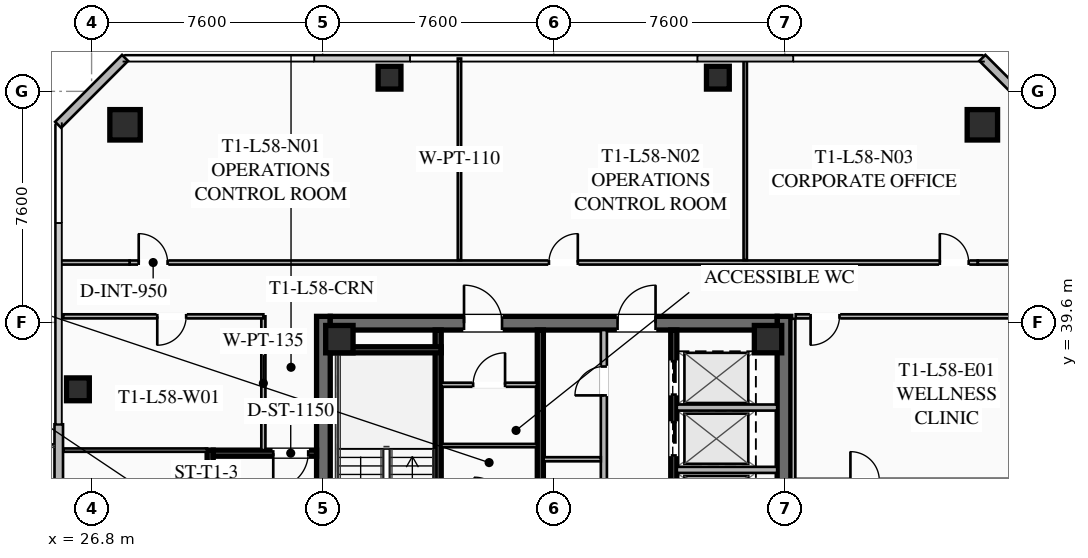
"""IFC4 building model, lengths in metres.
Left out: names, types, materials, properties, quantities, classifications, styles, units other than length and angle.
Written with IfcOpenShell. Run it as: python <this file> out.ifc"""

import sys

from ifc_helpers import new_model, si_unit, direction, frame, frame_2d, origin, origin_2d, place, context, subcontext, project, spatial, rectangle, hollow_rectangle, extrude, element, fill, save


model = new_model("IFC4")
c1 = context("Model", 3, precision=1e-05, world=origin(), true_north=direction((0.0, 1.0)))
c2 = subcontext(c1, "Body", "Model", "MODEL_VIEW")
j1 = project(units=[si_unit("LENGTHUNIT", "METRE"), si_unit("PLANEANGLEUNIT", "RADIAN")], contexts=[c1])
p1 = place(None, origin())
s1 = spatial("IfcSite", under=j1, at=p1, CompositionType="ELEMENT")
p2 = place(p1, origin())
s2 = spatial("IfcBuilding", under=s1, at=p2, CompositionType="ELEMENT")
p3 = place(p2, frame((0.0, 0.0, 214.85)))
s3 = spatial("IfcBuildingStorey", under=s2, at=p3, CompositionType="ELEMENT", Elevation=214.85)
for number, where, z_axis, x_axis in (
    (1, (34.425, 24.2, 0.0), (0.0, 0.0, 1.0), (0.0, 1.0, 0.0)),
    (2, (49.575, 39.8, 0.0), (0.0, 0.0, 1.0), (0.0, -1.0, 0.0)),
):
    element("IfcWall", number, at=place(p3, frame(where, z_axis=z_axis, x_axis=x_axis)), inside=s3, PredefinedType="SHEAR", context=c2, shape_type="SweptSolid", body=[
        extrude(rectangle(XDim=15.6, YDim=0.45, at=frame_2d((7.8, 0.0))), origin(), (0.0, 0.0, 1.0), 3.55),
    ])
p4 = place(p3, frame((34.65, 39.575, 0.0), z_axis=(0.0, 0.0, 1.0), x_axis=(1.0, 0.0, 0.0)))
e3 = element("IfcWall", 3, at=p4, inside=s3, PredefinedType="SHEAR", context=c2, shape_type="SweptSolid", body=[
    extrude(rectangle(XDim=14.7, YDim=0.45, at=frame_2d((7.35, 0.0))), origin(), (0.0, 0.0, 1.0), 3.55),
])
p5 = place(p4, frame((4.4, 0.0, 0.0)))
e4 = element("IfcOpeningElement", 4, at=p5, cuts=e3, PredefinedType="OPENING", context=c2, shape_type="SweptSolid", body=[
    extrude(rectangle(XDim=1.25, YDim=2.25, at=frame_2d((0.625, 1.125))), frame((0.0, 0.235, 0.0), z_axis=(0.0, -1.0, 0.0), x_axis=(1.0, 0.0, 0.0)), (0.0, 0.0, 1.0), 0.47),
])
p6 = place(p4, frame((9.45, 0.0, 0.0)))
e5 = element("IfcOpeningElement", 5, at=p6, cuts=e3, PredefinedType="OPENING", context=c2, shape_type="SweptSolid", body=[
    extrude(rectangle(XDim=1.25, YDim=2.25, at=frame_2d((0.625, 1.125))), frame((0.0, 0.235, 0.0), z_axis=(0.0, -1.0, 0.0), x_axis=(1.0, 0.0, 0.0)), (0.0, 0.0, 1.0), 0.47),
])
for number, where, z_axis, x_axis in (
    (6, (49.05, 39.05, 0.0), (0.0, 0.0, 1.0), (1.0, 0.0, 0.0)),
    (7, (34.95, 39.05, 0.0), (0.0, 0.0, 1.0), (1.0, 0.0, 0.0)),
):
    element("IfcColumn", number, at=place(p3, frame(where, z_axis=z_axis, x_axis=x_axis)), inside=s3, PredefinedType="COLUMN", context=c2, shape_type="SweptSolid", body=[
        extrude(hollow_rectangle(XDim=0.9, YDim=0.9, WallThickness=0.04, at=origin_2d()), origin(), (0.0, 0.0, 1.0), 3.37),
    ])
for number, where, z_axis, x_axis in (
    (8, (56.1, 46.1, 0.0), (0.0, 0.0, 1.0), (1.0, 0.0, 0.0)),
    (9, (27.9, 46.1, 0.0), (0.0, 0.0, 1.0), (1.0, 0.0, 0.0)),
):
    element("IfcColumn", number, at=place(p3, frame(where, z_axis=z_axis, x_axis=x_axis)), inside=s3, PredefinedType="COLUMN", context=c2, shape_type="SweptSolid", body=[
        extrude(hollow_rectangle(XDim=1.0, YDim=1.0, WallThickness=0.04, at=origin_2d()), origin(), (0.0, 0.0, 1.0), 3.37),
    ])
for number, where, z_axis, x_axis in (
    (10, (47.4, 47.65, 0.0), (0.0, 0.0, 1.0), (1.0, 0.0, 0.0)),
    (11, (36.6, 47.65, 0.0), (0.0, 0.0, 1.0), (1.0, 0.0, 0.0)),
    (12, (26.35, 37.4, 0.0), (0.0, 0.0, 1.0), (1.0, 0.0, 0.0)),
):
    element("IfcColumn", number, at=place(p3, frame(where, z_axis=z_axis, x_axis=x_axis)), inside=s3, PredefinedType="COLUMN", context=c2, shape_type="SweptSolid", body=[
        extrude(hollow_rectangle(XDim=0.75, YDim=0.75, WallThickness=0.032, at=origin_2d()), origin(), (0.0, 0.0, 1.0), 3.37),
    ])
p7 = place(p3, frame((25.72, 27.75, 0.0), z_axis=(0.0, 0.0, 1.0), x_axis=(0.0, 1.0, 0.0)))
e13 = element("IfcWall", 13, at=p7, inside=s3, PredefinedType="SOLIDWALL", context=c2, shape_type="SweptSolid", body=[
    extrude(rectangle(XDim=8.5, YDim=0.28, at=frame_2d((4.25, 0.0))), origin(), (0.0, 0.0, 1.0), 3.37),
])
p8 = place(p7, frame((3.6, 0.0, 0.0)))
e14 = element("IfcOpeningElement", 14, at=p8, cuts=e13, PredefinedType="OPENING", context=c2, shape_type="SweptSolid", body=[
    extrude(rectangle(XDim=1.3, YDim=2.15, at=frame_2d((0.65, 1.075))), frame((0.0, 0.15, 0.0), z_axis=(0.0, -1.0, 0.0), x_axis=(1.0, 0.0, 0.0)), (0.0, 0.0, 1.0), 0.3),
])
p9 = place(p7, frame((1.46, 0.0, 0.85)))
e15 = element("IfcOpeningElement", 15, at=p9, cuts=e13, PredefinedType="OPENING", context=c2, shape_type="SweptSolid", body=[
    extrude(rectangle(XDim=1.8, YDim=1.92, at=frame_2d((0.9, 0.96))), frame((0.0, 0.15, 0.0), z_axis=(0.0, -1.0, 0.0), x_axis=(1.0, 0.0, 0.0)), (0.0, 0.0, 1.0), 0.3),
])
for number, where, z_axis, x_axis in (
    (16, (25.7, 46.1, 0.0), (0.0, 0.0, 1.0), (0.707, 0.707, 0.0)),
    (17, (56.1, 48.3, 0.0), (0.0, 0.0, 1.0), (0.707, -0.707, 0.0)),
):
    element("IfcWall", number, at=place(p3, frame(where, z_axis=z_axis, x_axis=x_axis)), inside=s3, PredefinedType="SOLIDWALL", context=c2, shape_type="SweptSolid", body=[
        extrude(rectangle(XDim=3.111, YDim=0.28, at=frame_2d((1.556, 0.0))), origin(), (0.0, 0.0, 1.0), 3.37),
    ])
p10 = place(p3, frame((38.2, 31.2, 0.0), z_axis=(0.0, 0.0, 1.0), x_axis=(0.0, 1.0, 0.0)))
e18 = element("IfcWall", 18, at=p10, inside=s3, PredefinedType="SHEAR", context=c2, shape_type="SweptSolid", body=[
    extrude(rectangle(XDim=8.15, YDim=0.2, at=frame_2d((4.075, 0.0))), origin(), (0.0, 0.0, 1.0), 3.37),
])
p11 = place(p10, frame((0.45, 0.0, 0.0)))
e19 = element("IfcOpeningElement", 19, at=p11, cuts=e18, PredefinedType="OPENING", context=c2, shape_type="SweptSolid", body=[
    extrude(rectangle(XDim=1.15, YDim=2.2, at=frame_2d((0.575, 1.1))), frame((0.0, 0.11, 0.0), z_axis=(0.0, -1.0, 0.0), x_axis=(1.0, 0.0, 0.0)), (0.0, 0.0, 1.0), 0.22),
])
p12 = place(p3, frame((34.65, 38.7, 0.0), z_axis=(0.0, 0.0, 1.0), x_axis=(1.0, 0.0, 0.0)))
e20 = element("IfcWall", 20, at=p12, inside=s3, PredefinedType="SHEAR", context=c2, shape_type="SweptSolid", body=[
    extrude(rectangle(XDim=3.65, YDim=0.2, at=frame_2d((1.825, 0.0))), origin(), (0.0, 0.0, 1.0), 3.37),
])
p13 = place(p3, frame((41.56, 24.65, 0.0), z_axis=(0.0, 0.0, 1.0), x_axis=(0.0, 1.0, 0.0)))
e21 = element("IfcWall", 21, at=p13, inside=s3, PredefinedType="SHEAR", context=c2, shape_type="SweptSolid", body=[
    extrude(rectangle(XDim=14.7, YDim=0.2, at=frame_2d((7.35, 0.0))), origin(), (0.0, 0.0, 1.0), 3.37),
])
p14 = place(p3, frame((45.95, 39.35, 0.0), z_axis=(0.0, 0.0, 1.0), x_axis=(0.0, -1.0, 0.0)))
e22 = element("IfcWall", 22, at=p14, inside=s3, PredefinedType="SHEAR", context=c2, shape_type="SweptSolid", body=[
    extrude(rectangle(XDim=6.55, YDim=0.2, at=frame_2d((3.275, 0.0))), origin(), (0.0, 0.0, 1.0), 3.37),
])
p15 = place(p14, frame((5.075, 0.0, 0.0)))
e23 = element("IfcOpeningElement", 23, at=p15, cuts=e22, PredefinedType="OPENING", context=c2, shape_type="SweptSolid", body=[
    extrude(rectangle(XDim=1.1, YDim=2.2, at=frame_2d((0.55, 1.1))), frame((0.0, 0.11, 0.0), z_axis=(0.0, -1.0, 0.0), x_axis=(1.0, 0.0, 0.0)), (0.0, 0.0, 1.0), 0.22),
])
p16 = place(p14, frame((3.025, 0.0, 0.0)))
e24 = element("IfcOpeningElement", 24, at=p16, cuts=e22, PredefinedType="OPENING", context=c2, shape_type="SweptSolid", body=[
    extrude(rectangle(XDim=1.1, YDim=2.2, at=frame_2d((0.55, 1.1))), frame((0.0, 0.11, 0.0), z_axis=(0.0, -1.0, 0.0), x_axis=(1.0, 0.0, 0.0)), (0.0, 0.0, 1.0), 0.22),
])
p17 = place(p14, frame((1.025, 0.0, 0.0)))
e25 = element("IfcOpeningElement", 25, at=p17, cuts=e22, PredefinedType="OPENING", context=c2, shape_type="SweptSolid", body=[
    extrude(rectangle(XDim=1.1, YDim=2.2, at=frame_2d((0.55, 1.1))), frame((0.0, 0.11, 0.0), z_axis=(0.0, -1.0, 0.0), x_axis=(1.0, 0.0, 0.0)), (0.0, 0.0, 1.0), 0.22),
])
for number, where, z_axis, x_axis in (
    (26, (46.05, 34.75, 0.0), (0.0, 0.0, 1.0), (1.0, 0.0, 0.0)),
    (27, (46.05, 36.8, 0.0), (0.0, 0.0, 1.0), (1.0, 0.0, 0.0)),
):
    element("IfcWall", number, at=place(p3, frame(where, z_axis=z_axis, x_axis=x_axis)), inside=s3, PredefinedType="SOLIDWALL", context=c2, shape_type="SweptSolid", body=[
        extrude(rectangle(XDim=3.3, YDim=0.2, at=frame_2d((1.65, 0.0))), origin(), (0.0, 0.0, 1.0), 3.37),
    ])
p18 = place(p3, frame((38.3, 37.55, 0.0), z_axis=(0.0, 0.0, 1.0), x_axis=(1.0, 0.0, 0.0)))
e28 = element("IfcWall", 28, at=p18, inside=s3, PredefinedType="PARTITIONING", context=c2, shape_type="SweptSolid", body=[
    extrude(rectangle(XDim=3.15, YDim=0.135, at=frame_2d((1.575, 0.0))), origin(), (0.0, 0.0, 1.0), 2.723),
])
p19 = place(p18, frame((1.05, 0.0, 0.0)))
e29 = element("IfcOpeningElement", 29, at=p19, cuts=e28, PredefinedType="OPENING", context=c2, shape_type="SweptSolid", body=[
    extrude(rectangle(XDim=1.05, YDim=2.2, at=frame_2d((0.525, 1.1))), frame((0.0, 0.077, 0.0), z_axis=(0.0, -1.0, 0.0), x_axis=(1.0, 0.0, 0.0)), (0.0, 0.0, 1.0), 0.155),
])
p20 = place(p3, frame((38.3, 35.55, 0.0), z_axis=(0.0, 0.0, 1.0), x_axis=(1.0, 0.0, 0.0)))
e30 = element("IfcWall", 30, at=p20, inside=s3, PredefinedType="PARTITIONING", context=c2, shape_type="SweptSolid", body=[
    extrude(rectangle(XDim=3.15, YDim=0.11, at=frame_2d((1.575, 0.0))), origin(), (0.0, 0.0, 1.0), 2.723),
])
p21 = place(p3, frame((43.65, 32.35, 0.0), z_axis=(0.0, 0.0, 1.0), x_axis=(0.0, 1.0, 0.0)))
e31 = element("IfcWall", 31, at=p21, inside=s3, PredefinedType="SOLIDWALL", context=c2, shape_type="SweptSolid", body=[
    extrude(rectangle(XDim=7.0, YDim=0.2, at=frame_2d((3.5, 0.0))), origin(), (0.0, 0.0, 1.0), 2.723),
])
p22 = place(p21, frame((0.85, 0.0, 0.0)))
e32 = element("IfcOpeningElement", 32, at=p22, cuts=e31, PredefinedType="OPENING", context=c2, shape_type="SweptSolid", body=[
    extrude(rectangle(XDim=0.95, YDim=2.05, at=frame_2d((0.475, 1.025))), frame((0.0, 0.11, 0.0), z_axis=(0.0, -1.0, 0.0), x_axis=(1.0, 0.0, 0.0)), (0.0, 0.0, 1.0), 0.22),
])
p23 = place(p21, frame((4.85, 0.0, 0.0)))
e33 = element("IfcOpeningElement", 33, at=p23, cuts=e31, PredefinedType="OPENING", context=c2, shape_type="SweptSolid", body=[
    extrude(rectangle(XDim=0.95, YDim=2.05, at=frame_2d((0.475, 1.025))), frame((0.0, 0.11, 0.0), z_axis=(0.0, -1.0, 0.0), x_axis=(1.0, 0.0, 0.0)), (0.0, 0.0, 1.0), 0.22),
])
p24 = place(p3, frame((41.67, 35.1, 0.0), z_axis=(0.0, 0.0, 1.0), x_axis=(1.0, 0.0, 0.0)))
e34 = element("IfcWall", 34, at=p24, inside=s3, PredefinedType="PARTITIONING", context=c2, shape_type="SweptSolid", body=[
    extrude(rectangle(XDim=1.88, YDim=0.135, at=frame_2d((0.94, 0.0))), origin(), (0.0, 0.0, 1.0), 2.723),
])
p25 = place(p3, frame((30.7, 28.6, 0.0), z_axis=(0.0, 0.0, 1.0), x_axis=(0.0, 1.0, 0.0)))
e35 = element("IfcWall", 35, at=p25, inside=s3, PredefinedType="SHEAR", context=c2, shape_type="SweptSolid", body=[
    extrude(rectangle(XDim=6.8, YDim=0.2, at=frame_2d((3.4, 0.0))), origin(), (0.0, 0.0, 1.0), 3.37),
])
p26 = place(p3, frame((34.2, 35.3, 0.0), z_axis=(0.0, 0.0, 1.0), x_axis=(-1.0, 0.0, 0.0)))
e36 = element("IfcWall", 36, at=p26, inside=s3, PredefinedType="SHEAR", context=c2, shape_type="SweptSolid", body=[
    extrude(rectangle(XDim=3.4, YDim=0.2, at=frame_2d((1.7, 0.0))), origin(), (0.0, 0.0, 1.0), 3.37),
])
p27 = place(p26, frame((0.275, 0.0, 0.0)))
e37 = element("IfcOpeningElement", 37, at=p27, cuts=e36, PredefinedType="OPENING", context=c2, shape_type="SweptSolid", body=[
    extrude(rectangle(XDim=1.15, YDim=2.2, at=frame_2d((0.575, 1.1))), frame((0.0, 0.11, 0.0), z_axis=(0.0, -1.0, 0.0), x_axis=(1.0, 0.0, 0.0)), (0.0, 0.0, 1.0), 0.22),
])
p28 = place(p3, frame((32.45, 35.4, 0.0), z_axis=(0.0, 0.0, 1.0), x_axis=(0.0, 1.0, 0.0)))
e38 = element("IfcWall", 38, at=p28, inside=s3, PredefinedType="PARTITIONING", context=c2, shape_type="SweptSolid", body=[
    extrude(rectangle(XDim=4.4, YDim=0.135, at=frame_2d((2.2, 0.0))), origin(), (0.0, 0.0, 1.0), 2.723),
])
p29 = place(p3, frame((28.05, 41.57, 0.0), z_axis=(0.0, 0.0, 1.0), x_axis=(1.0, 0.0, 0.0)))
e39 = element("IfcWall", 39, at=p29, inside=s3, PredefinedType="PARTITIONING", context=c2, shape_type="SweptSolid", body=[
    extrude(rectangle(XDim=27.9, YDim=0.135, at=frame_2d((13.95, 0.0))), origin(), (0.0, 0.0, 1.0), 2.723),
])
p30 = place(p29, frame((0.3, 0.0, 0.0)))
e40 = element("IfcOpeningElement", 40, at=p30, cuts=e39, PredefinedType="OPENING", context=c2, shape_type="SweptSolid", body=[
    extrude(rectangle(XDim=0.95, YDim=2.05, at=frame_2d((0.475, 1.025))), frame((0.0, 0.077, 0.0), z_axis=(0.0, -1.0, 0.0), x_axis=(1.0, 0.0, 0.0)), (0.0, 0.0, 1.0), 0.155),
])
p31 = place(p29, frame((13.793, 0.0, 0.0)))
e41 = element("IfcOpeningElement", 41, at=p31, cuts=e39, PredefinedType="OPENING", context=c2, shape_type="SweptSolid", body=[
    extrude(rectangle(XDim=0.95, YDim=2.05, at=frame_2d((0.475, 1.025))), frame((0.0, 0.077, 0.0), z_axis=(0.0, -1.0, 0.0), x_axis=(1.0, 0.0, 0.0)), (0.0, 0.0, 1.0), 0.155),
])
p32 = place(p29, frame((26.65, 0.0, 0.0)))
e42 = element("IfcOpeningElement", 42, at=p32, cuts=e39, PredefinedType="OPENING", context=c2, shape_type="SweptSolid", body=[
    extrude(rectangle(XDim=0.95, YDim=2.05, at=frame_2d((0.475, 1.025))), frame((0.0, 0.077, 0.0), z_axis=(0.0, -1.0, 0.0), x_axis=(1.0, 0.0, 0.0)), (0.0, 0.0, 1.0), 0.155),
])
for number, where, z_axis, x_axis in (
    (43, (25.72, 41.57, 0.0), (0.0, 0.0, 1.0), (1.0, 0.0, 0.0)),
    (44, (55.95, 41.57, 0.0), (0.0, 0.0, 1.0), (1.0, 0.0, 0.0)),
):
    element("IfcWall", number, at=place(p3, frame(where, z_axis=z_axis, x_axis=x_axis)), inside=s3, PredefinedType="PARTITIONING", context=c2, shape_type="SweptSolid", body=[
        extrude(rectangle(XDim=2.33, YDim=0.135, at=frame_2d((1.165, 0.0))), origin(), (0.0, 0.0, 1.0), 2.723),
    ])
for number, where, z_axis, x_axis in (
    (45, (38.9, 41.65, 0.0), (0.0, 0.0, 1.0), (0.0, 1.0, 0.0)),
    (46, (48.3, 41.65, 0.0), (0.0, 0.0, 1.0), (0.0, 1.0, 0.0)),
):
    element("IfcWall", number, at=place(p3, frame(where, z_axis=z_axis, x_axis=x_axis)), inside=s3, PredefinedType="PARTITIONING", context=c2, shape_type="SweptSolid", body=[
        extrude(rectangle(XDim=6.63, YDim=0.11, at=frame_2d((3.315, 0.0))), origin(), (0.0, 0.0, 1.0), 2.723),
    ])
p33 = place(p3, frame((49.88, 39.72, 0.0), z_axis=(0.0, 0.0, 1.0), x_axis=(0.0, -1.0, 0.0)))
e47 = element("IfcWall", 47, at=p33, inside=s3, PredefinedType="PARTITIONING", context=c2, shape_type="SweptSolid", body=[
    extrude(rectangle(XDim=15.44, YDim=0.135, at=frame_2d((7.72, 0.0))), origin(), (0.0, 0.0, 1.0), 2.723),
])
p34 = place(p3, frame((58.28, 39.8, 0.0), z_axis=(0.0, 0.0, 1.0), x_axis=(-1.0, 0.0, 0.0)))
e48 = element("IfcWall", 48, at=p34, inside=s3, PredefinedType="PARTITIONING", context=c2, shape_type="SweptSolid", body=[
    extrude(rectangle(XDim=8.32, YDim=0.135, at=frame_2d((4.16, 0.0))), origin(), (0.0, 0.0, 1.0), 2.723),
])
p35 = place(p34, frame((6.88, 0.0, 0.0)))
e49 = element("IfcOpeningElement", 49, at=p35, cuts=e48, PredefinedType="OPENING", context=c2, shape_type="SweptSolid", body=[
    extrude(rectangle(XDim=0.95, YDim=2.05, at=frame_2d((0.475, 1.025))), frame((0.0, 0.077, 0.0), z_axis=(0.0, -1.0, 0.0), x_axis=(1.0, 0.0, 0.0)), (0.0, 0.0, 1.0), 0.155),
])
p36 = place(p3, frame((32.45, 39.8, 0.0), z_axis=(0.0, 0.0, 1.0), x_axis=(-1.0, 0.0, 0.0)))
e50 = element("IfcWall", 50, at=p36, inside=s3, PredefinedType="PARTITIONING", context=c2, shape_type="SweptSolid", body=[
    extrude(rectangle(XDim=6.58, YDim=0.135, at=frame_2d((3.29, 0.0))), origin(), (0.0, 0.0, 1.0), 2.723),
])
p37 = place(p36, frame((2.54, 0.0, 0.0)))
e51 = element("IfcOpeningElement", 51, at=p37, cuts=e50, PredefinedType="OPENING", context=c2, shape_type="SweptSolid", body=[
    extrude(rectangle(XDim=0.95, YDim=2.05, at=frame_2d((0.475, 1.025))), frame((0.0, 0.077, 0.0), z_axis=(0.0, -1.0, 0.0), x_axis=(1.0, 0.0, 0.0)), (0.0, 0.0, 1.0), 0.155),
])
p38 = place(p3, frame((30.6, 35.4, 0.0), z_axis=(0.0, 0.0, 1.0), x_axis=(-1.0, 0.0, 0.0)))
e52 = element("IfcWall", 52, at=p38, inside=s3, PredefinedType="PARTITIONING", context=c2, shape_type="SweptSolid", body=[
    extrude(rectangle(XDim=4.73, YDim=0.11, at=frame_2d((2.365, 0.0))), origin(), (0.0, 0.0, 1.0), 2.723),
])
p39 = place(p5, origin())
e53 = element("IfcDoor", 53, at=p39, inside=s3, OperationType="SINGLE_SWING_LEFT", PredefinedType="DOOR", context=c2, shape_type="SweptSolid", body=[
    extrude(rectangle(XDim=1.25, YDim=2.25, at=frame_2d((0.625, 1.125))), frame((0.0, 0.025, 0.0), z_axis=(0.0, -1.0, 0.0), x_axis=(1.0, 0.0, 0.0)), (0.0, 0.0, 1.0), 0.05),
])
fill(e4, e53)
p40 = place(p6, origin())
e54 = element("IfcDoor", 54, at=p40, inside=s3, OperationType="SINGLE_SWING_RIGHT", PredefinedType="DOOR", context=c2, shape_type="SweptSolid", body=[
    extrude(rectangle(XDim=1.25, YDim=2.25, at=frame_2d((0.625, 1.125))), frame((0.0, 0.025, 0.0), z_axis=(0.0, -1.0, 0.0), x_axis=(1.0, 0.0, 0.0)), (0.0, 0.0, 1.0), 0.05),
])
fill(e5, e54)
p41 = place(p19, origin())
e55 = element("IfcDoor", 55, at=p41, inside=s3, OperationType="SINGLE_SWING_RIGHT", PredefinedType="DOOR", context=c2, shape_type="SweptSolid", body=[
    extrude(rectangle(XDim=1.05, YDim=2.2, at=frame_2d((0.525, 1.1))), frame((0.0, 0.025, 0.0), z_axis=(0.0, -1.0, 0.0), x_axis=(1.0, 0.0, 0.0)), (0.0, 0.0, 1.0), 0.05),
])
fill(e29, e55)
p42 = place(p23, origin())
e56 = element("IfcDoor", 56, at=p42, inside=s3, OperationType="SINGLE_SWING_LEFT", PredefinedType="DOOR", context=c2, shape_type="SweptSolid", body=[
    extrude(rectangle(XDim=0.95, YDim=2.05, at=frame_2d((0.475, 1.025))), frame((0.0, 0.025, 0.0), z_axis=(0.0, -1.0, 0.0), x_axis=(1.0, 0.0, 0.0)), (0.0, 0.0, 1.0), 0.05),
])
fill(e33, e56)
p43 = place(p27, origin())
e57 = element("IfcDoor", 57, at=p43, inside=s3, OperationType="SINGLE_SWING_RIGHT", PredefinedType="DOOR", context=c2, shape_type="SweptSolid", body=[
    extrude(rectangle(XDim=1.15, YDim=2.2, at=frame_2d((0.575, 1.1))), frame((0.0, 0.025, 0.0), z_axis=(0.0, -1.0, 0.0), x_axis=(1.0, 0.0, 0.0)), (0.0, 0.0, 1.0), 0.05),
])
fill(e37, e57)
p44 = place(p30, origin())
e58 = element("IfcDoor", 58, at=p44, inside=s3, OperationType="SINGLE_SWING_LEFT", PredefinedType="DOOR", context=c2, shape_type="SweptSolid", body=[
    extrude(rectangle(XDim=0.95, YDim=2.05, at=frame_2d((0.475, 1.025))), frame((0.0, 0.025, 0.0), z_axis=(0.0, -1.0, 0.0), x_axis=(1.0, 0.0, 0.0)), (0.0, 0.0, 1.0), 0.05),
])
fill(e40, e58)
p45 = place(p31, origin())
e59 = element("IfcDoor", 59, at=p45, inside=s3, OperationType="SINGLE_SWING_RIGHT", PredefinedType="DOOR", context=c2, shape_type="SweptSolid", body=[
    extrude(rectangle(XDim=0.95, YDim=2.05, at=frame_2d((0.475, 1.025))), frame((0.0, 0.025, 0.0), z_axis=(0.0, -1.0, 0.0), x_axis=(1.0, 0.0, 0.0)), (0.0, 0.0, 1.0), 0.05),
])
fill(e41, e59)
p46 = place(p32, origin())
e60 = element("IfcDoor", 60, at=p46, inside=s3, OperationType="SINGLE_SWING_LEFT", PredefinedType="DOOR", context=c2, shape_type="SweptSolid", body=[
    extrude(rectangle(XDim=0.95, YDim=2.05, at=frame_2d((0.475, 1.025))), frame((0.0, 0.025, 0.0), z_axis=(0.0, -1.0, 0.0), x_axis=(1.0, 0.0, 0.0)), (0.0, 0.0, 1.0), 0.05),
])
fill(e42, e60)
p47 = place(p35, origin())
e61 = element("IfcDoor", 61, at=p47, inside=s3, OperationType="SINGLE_SWING_RIGHT", PredefinedType="DOOR", context=c2, shape_type="SweptSolid", body=[
    extrude(rectangle(XDim=0.95, YDim=2.05, at=frame_2d((0.475, 1.025))), frame((0.0, 0.025, 0.0), z_axis=(0.0, -1.0, 0.0), x_axis=(1.0, 0.0, 0.0)), (0.0, 0.0, 1.0), 0.05),
])
fill(e49, e61)
p48 = place(p37, origin())
e62 = element("IfcDoor", 62, at=p48, inside=s3, OperationType="SINGLE_SWING_RIGHT", PredefinedType="DOOR", context=c2, shape_type="SweptSolid", body=[
    extrude(rectangle(XDim=0.95, YDim=2.05, at=frame_2d((0.475, 1.025))), frame((0.0, 0.025, 0.0), z_axis=(0.0, -1.0, 0.0), x_axis=(1.0, 0.0, 0.0)), (0.0, 0.0, 1.0), 0.05),
])
fill(e51, e62)
p49 = place(p16, origin())
e63 = element("IfcDoor", 63, at=p49, inside=s3, OperationType="SLIDING_TO_LEFT", PredefinedType="DOOR", context=c2, shape_type="SweptSolid", body=[
    extrude(rectangle(XDim=1.1, YDim=2.2, at=frame_2d((0.55, 1.1))), frame((0.0, 0.025, 0.0), z_axis=(0.0, -1.0, 0.0), x_axis=(1.0, 0.0, 0.0)), (0.0, 0.0, 1.0), 0.05),
])
fill(e24, e63)
p50 = place(p17, origin())
e64 = element("IfcDoor", 64, at=p50, inside=s3, OperationType="SLIDING_TO_LEFT", PredefinedType="DOOR", context=c2, shape_type="SweptSolid", body=[
    extrude(rectangle(XDim=1.1, YDim=2.2, at=frame_2d((0.55, 1.1))), frame((0.0, 0.025, 0.0), z_axis=(0.0, -1.0, 0.0), x_axis=(1.0, 0.0, 0.0)), (0.0, 0.0, 1.0), 0.05),
])
fill(e25, e64)
save(model, sys.argv[1])
